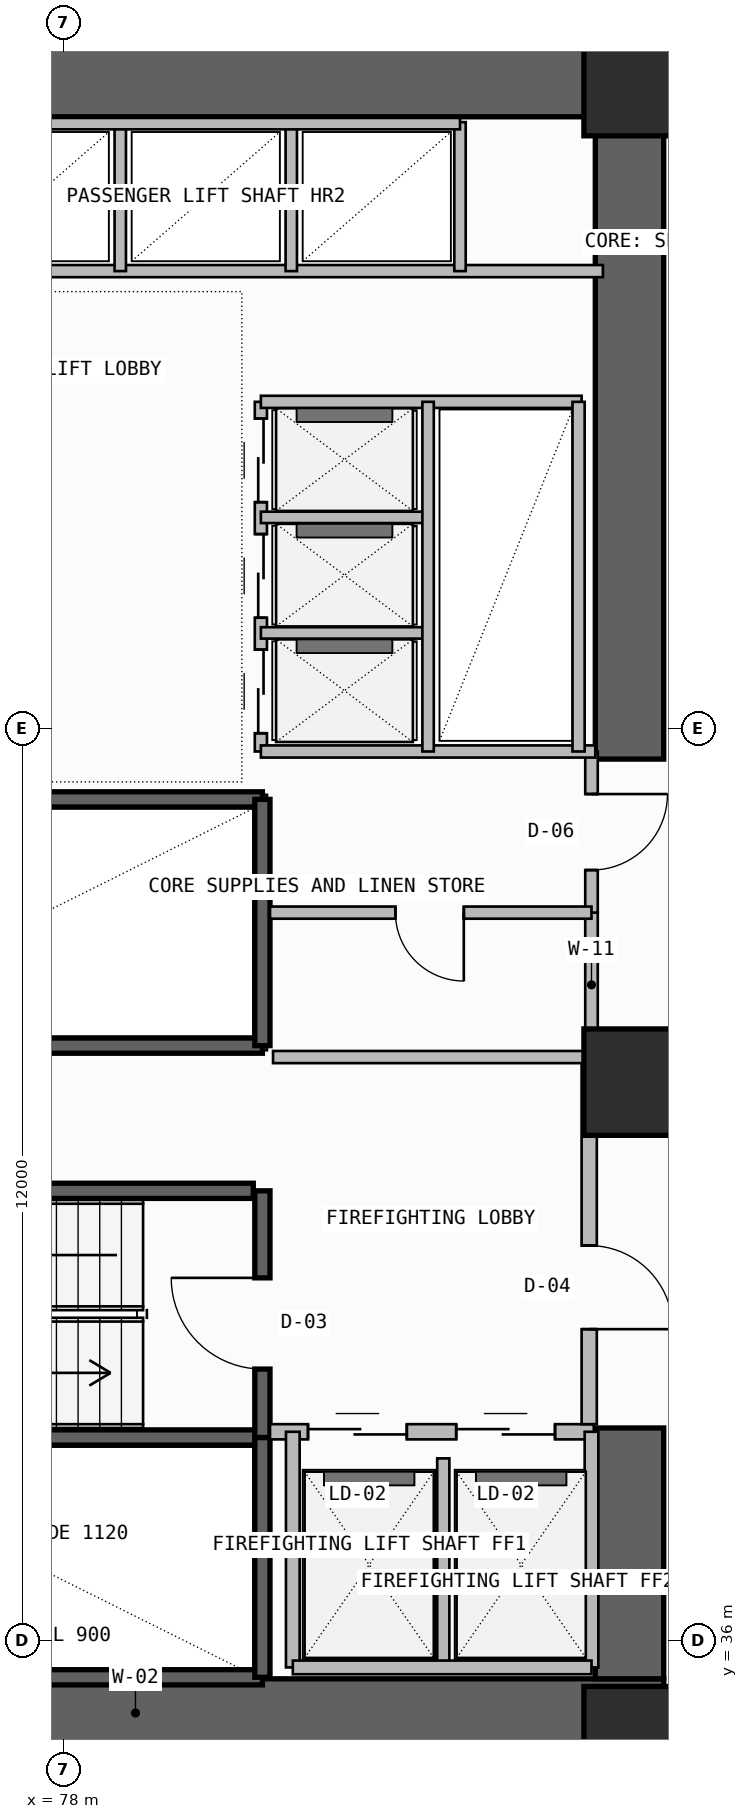
"""IFC4 building model, lengths in metres.
Left out: names, types, materials, properties, quantities, classifications, styles, units other than length and angle.
Written with IfcOpenShell. Run it as: python <this file> out.ifc"""

import sys

from ifc_helpers import new_model, si_unit, direction, frame, frame_2d, origin, origin_2d, place, context, subcontext, project, spatial, rectangle, extrude, element, fill, save


model = new_model("IFC4")
c1 = context("Model", 3, precision=1e-05, world=origin(), true_north=direction((0.0, 1.0)))
c2 = subcontext(c1, "Body", "Model", "MODEL_VIEW")
j1 = project(units=[si_unit("LENGTHUNIT", "METRE"), si_unit("PLANEANGLEUNIT", "RADIAN")], contexts=[c1])
p1 = place(None, origin())
s1 = spatial("IfcSite", under=j1, at=p1, CompositionType="ELEMENT")
p2 = place(p1, origin())
s2 = spatial("IfcBuilding", under=s1, at=p2, CompositionType="ELEMENT")
p3 = place(p2, frame((0.0, 0.0, 113.7)))
s3 = spatial("IfcBuildingStorey", under=s2, at=p3, CompositionType="ELEMENT", Elevation=113.7)
p4 = place(p3, frame((72.0, 35.05, -0.26), z_axis=(0.0, 0.0, 1.0), x_axis=(1.0, 0.0, 0.0)))
e1 = element("IfcWall", 1, at=p4, inside=s3, PredefinedType="SHEAR", context=c2, shape_type="SweptSolid", body=[
    extrude(rectangle(XDim=13.9, YDim=0.9, at=frame_2d((6.95, 0.0))), origin(), (0.0, 0.0, 1.0), 3.6),
])
p5 = place(p3, frame((85.45, 35.5, -0.26), z_axis=(0.0, 0.0, 1.0), x_axis=(0.0, 1.0, 0.0)))
e2 = element("IfcWall", 2, at=p5, inside=s3, PredefinedType="SHEAR", context=c2, shape_type="SweptSolid", body=[
    extrude(rectangle(XDim=3.3, YDim=0.9, at=frame_2d((1.65, 0.0))), origin(), (0.0, 0.0, 1.0), 3.6),
])
p6 = place(p3, frame((72.0, 56.5, -0.26), z_axis=(0.0, 0.0, 1.0), x_axis=(1.0, 0.0, 0.0)))
e3 = element("IfcWall", 3, at=p6, inside=s3, PredefinedType="SHEAR", context=c2, shape_type="SweptSolid", body=[
    extrude(rectangle(XDim=13.9, YDim=0.9, at=frame_2d((6.95, 0.0))), origin(), (0.0, 0.0, 1.0), 3.6),
])
p7 = place(p3, frame((85.45, 47.6, -0.26), z_axis=(0.0, 0.0, 1.0), x_axis=(0.0, 1.0, 0.0)))
e4 = element("IfcWall", 4, at=p7, inside=s3, PredefinedType="SHEAR", context=c2, shape_type="SweptSolid", body=[
    extrude(rectangle(XDim=8.45, YDim=0.9, at=frame_2d((4.225, 0.0))), origin(), (0.0, 0.0, 1.0), 3.6),
])
for number, where, z_axis, x_axis in (
    (5, (85.55, 34.7, 0.0), (0.0, 0.0, 1.0), (1.0, 0.0, 0.0)),
    (6, (85.55, 43.35, 0.0), (0.0, 0.0, 1.0), (1.0, 0.0, 0.0)),
    (7, (85.55, 56.5, 0.0), (0.0, 0.0, 1.0), (1.0, 0.0, 0.0)),
):
    element("IfcColumn", number, at=place(p3, frame(where, z_axis=z_axis, x_axis=x_axis)), inside=s3, PredefinedType="COLUMN", context=c2, shape_type="SweptSolid", body=[
        extrude(rectangle(XDim=1.4, YDim=1.4, at=origin_2d()), origin(), (0.0, 0.0, 1.0), 3.6),
    ])
for number, where, z_axis, x_axis in (
    (8, (72.92, 35.52, -0.26), (0.0, 0.0, 1.0), (1.0, 0.0, 0.0)),
    (9, (72.92, 38.675, -0.26), (0.0, 0.0, 1.0), (1.0, 0.0, 0.0)),
):
    element("IfcWall", number, at=place(p3, frame(where, z_axis=z_axis, x_axis=x_axis)), inside=s3, PredefinedType="SOLIDWALL", context=c2, shape_type="SweptSolid", body=[
        extrude(rectangle(XDim=7.7, YDim=0.2, at=frame_2d((3.85, 0.0))), origin(), (0.0, 0.0, 1.0), 3.6),
    ])
p8 = place(p3, frame((80.62, 35.52, -0.26), z_axis=(0.0, 0.0, 1.0), x_axis=(0.0, 1.0, 0.0)))
e10 = element("IfcWall", 10, at=p8, inside=s3, PredefinedType="SOLIDWALL", context=c2, shape_type="SweptSolid", body=[
    extrude(rectangle(XDim=3.155, YDim=0.2, at=frame_2d((1.578, 0.0))), origin(), (0.0, 0.0, 1.0), 3.6),
])
p9 = place(p3, frame((80.62, 38.675, -0.26), z_axis=(0.0, 0.0, 1.0), x_axis=(0.0, 1.0, 0.0)))
e11 = element("IfcWall", 11, at=p9, inside=s3, PredefinedType="SOLIDWALL", context=c2, shape_type="SweptSolid", body=[
    extrude(rectangle(XDim=3.245, YDim=0.2, at=frame_2d((1.623, 0.0))), origin(), (0.0, 0.0, 1.0), 3.6),
])
p10 = place(p9, frame((0.9, 0.0, 0.26)))
e12 = element("IfcOpeningElement", 12, at=p10, cuts=e11, PredefinedType="OPENING", context=c2, shape_type="SweptSolid", body=[
    extrude(rectangle(XDim=1.2, YDim=2.2, at=frame_2d((0.6, 1.1))), frame((0.0, 0.11, 0.0), z_axis=(0.0, -1.0, 0.0), x_axis=(1.0, 0.0, 0.0)), (0.0, 0.0, 1.0), 0.22),
])
p11 = place(p3, frame((80.72, 38.75, 0.0), z_axis=(0.0, 0.0, 1.0), x_axis=(1.0, 0.0, 0.0)))
e13 = element("IfcWall", 13, at=p11, inside=s3, PredefinedType="SOLIDWALL", context=c2, shape_type="SweptSolid", body=[
    extrude(rectangle(XDim=4.26, YDim=0.2, at=frame_2d((2.13, 0.0))), origin(), (0.0, 0.0, 1.0), 3.34),
])
p12 = place(p11, frame((0.5, 0.0, 0.0)))
e14 = element("IfcOpeningElement", 14, at=p12, cuts=e13, PredefinedType="OPENING", context=c2, shape_type="SweptSolid", body=[
    extrude(rectangle(XDim=1.3, YDim=2.3, at=frame_2d((0.65, 1.15))), frame((0.0, 0.11, 0.0), z_axis=(0.0, -1.0, 0.0), x_axis=(1.0, 0.0, 0.0)), (0.0, 0.0, 1.0), 0.22),
])
p13 = place(p11, frame((2.45, 0.0, 0.0)))
e15 = element("IfcOpeningElement", 15, at=p13, cuts=e13, PredefinedType="OPENING", context=c2, shape_type="SweptSolid", body=[
    extrude(rectangle(XDim=1.3, YDim=2.3, at=frame_2d((0.65, 1.15))), frame((0.0, 0.11, 0.0), z_axis=(0.0, -1.0, 0.0), x_axis=(1.0, 0.0, 0.0)), (0.0, 0.0, 1.0), 0.22),
])
p14 = place(p3, frame((83.0, 35.65, 0.0), z_axis=(0.0, 0.0, 1.0), x_axis=(0.0, 1.0, 0.0)))
e16 = element("IfcWall", 16, at=p14, inside=s3, PredefinedType="PLUMBINGWALL", context=c2, shape_type="SweptSolid", body=[
    extrude(rectangle(XDim=2.75, YDim=0.16, at=frame_2d((1.375, 0.0))), origin(), (0.0, 0.0, 1.0), 3.34),
])
for number, where, z_axis, x_axis in (
    (17, (84.95, 35.65, 0.0), (0.0, 0.0, 1.0), (0.0, 1.0, 0.0)),
    (18, (81.02, 35.65, 0.0), (0.0, 0.0, 1.0), (0.0, 1.0, 0.0)),
):
    element("IfcWall", number, at=place(p3, frame(where, z_axis=z_axis, x_axis=x_axis)), inside=s3, PredefinedType="SOLIDWALL", context=c2, shape_type="SweptSolid", body=[
        extrude(rectangle(XDim=3.1, YDim=0.18, at=frame_2d((1.55, 0.0))), origin(), (0.0, 0.0, 1.0), 3.34),
    ])
p15 = place(p3, frame((81.02, 35.65, 0.0), z_axis=(0.0, 0.0, 1.0), x_axis=(1.0, 0.0, 0.0)))
e19 = element("IfcWall", 19, at=p15, inside=s3, PredefinedType="SOLIDWALL", context=c2, shape_type="SweptSolid", body=[
    extrude(rectangle(XDim=3.93, YDim=0.18, at=frame_2d((1.965, 0.0))), origin(), (0.0, 0.0, 1.0), 3.34),
])
p16 = place(p3, frame((84.92, 38.85, 0.0), z_axis=(0.0, 0.0, 1.0), x_axis=(0.0, 1.0, 0.0)))
e20 = element("IfcWall", 20, at=p16, inside=s3, PredefinedType="SOLIDWALL", context=c2, shape_type="SweptSolid", body=[
    extrude(rectangle(XDim=4.83, YDim=0.2, at=frame_2d((2.415, 0.0))), origin(), (0.0, 0.0, 1.0), 3.34),
])
p17 = place(p16, frame((1.25, 0.0, 0.0)))
e21 = element("IfcOpeningElement", 21, at=p17, cuts=e20, PredefinedType="OPENING", context=c2, shape_type="SweptSolid", body=[
    extrude(rectangle(XDim=1.1, YDim=2.2, at=frame_2d((0.55, 1.1))), frame((0.0, 0.11, 0.0), z_axis=(0.0, -1.0, 0.0), x_axis=(1.0, 0.0, 0.0)), (0.0, 0.0, 1.0), 0.22),
])
p18 = place(p3, frame((72.92, 41.92, -0.26), z_axis=(0.0, 0.0, 1.0), x_axis=(1.0, 0.0, 0.0)))
e22 = element("IfcWall", 22, at=p18, inside=s3, PredefinedType="SOLIDWALL", context=c2, shape_type="SweptSolid", body=[
    extrude(rectangle(XDim=7.58, YDim=0.2, at=frame_2d((3.79, 0.0))), origin(), (0.0, 0.0, 1.0), 3.6),
])
for number, where, z_axis, x_axis in (
    (23, (72.92, 43.83, -0.26), (0.0, 0.0, 1.0), (1.0, 0.0, 0.0)),
    (24, (72.92, 47.07, -0.26), (0.0, 0.0, 1.0), (1.0, 0.0, 0.0)),
):
    element("IfcWall", number, at=place(p3, frame(where, z_axis=z_axis, x_axis=x_axis)), inside=s3, PredefinedType="SOLIDWALL", context=c2, shape_type="SweptSolid", body=[
        extrude(rectangle(XDim=7.7, YDim=0.2, at=frame_2d((3.85, 0.0))), origin(), (0.0, 0.0, 1.0), 3.6),
    ])
p19 = place(p3, frame((80.62, 43.83, -0.26), z_axis=(0.0, 0.0, 1.0), x_axis=(0.0, 1.0, 0.0)))
e25 = element("IfcWall", 25, at=p19, inside=s3, PredefinedType="SOLIDWALL", context=c2, shape_type="SweptSolid", body=[
    extrude(rectangle(XDim=3.24, YDim=0.2, at=frame_2d((1.62, 0.0))), origin(), (0.0, 0.0, 1.0), 3.6),
])
p20 = place(p3, frame((84.95, 43.68, 0.0), z_axis=(0.0, 0.0, 1.0), x_axis=(0.0, 1.0, 0.0)))
e26 = element("IfcWall", 26, at=p20, inside=s3, PredefinedType="PLUMBINGWALL", context=c2, shape_type="SweptSolid", body=[
    extrude(rectangle(XDim=1.9, YDim=0.165, at=frame_2d((0.95, 0.0))), origin(), (0.0, 0.0, 1.0), 3.34),
])
p21 = place(p3, frame((84.95, 45.58, 0.0), z_axis=(0.0, 0.0, 1.0), x_axis=(0.0, 1.0, 0.0)))
e27 = element("IfcWall", 27, at=p21, inside=s3, PredefinedType="PARTITIONING", context=c2, shape_type="SweptSolid", body=[
    extrude(rectangle(XDim=2.12, YDim=0.165, at=frame_2d((1.06, 0.0))), origin(), (0.0, 0.0, 1.0), 3.34),
])
p22 = place(p21, frame((0.56, 0.0, 0.0)))
e28 = element("IfcOpeningElement", 28, at=p22, cuts=e27, PredefinedType="OPENING", context=c2, shape_type="SweptSolid", body=[
    extrude(rectangle(XDim=1.0, YDim=2.2, at=frame_2d((0.5, 1.1))), frame((0.0, 0.093, 0.0), z_axis=(0.0, -1.0, 0.0), x_axis=(1.0, 0.0, 0.0)), (0.0, 0.0, 1.0), 0.185),
])
p23 = place(p3, frame((80.72, 45.58, 0.0), z_axis=(0.0, 0.0, 1.0), x_axis=(1.0, 0.0, 0.0)))
e29 = element("IfcWall", 29, at=p23, inside=s3, PredefinedType="PLUMBINGWALL", context=c2, shape_type="SweptSolid", body=[
    extrude(rectangle(XDim=4.23, YDim=0.16, at=frame_2d((2.115, 0.0))), origin(), (0.0, 0.0, 1.0), 3.34),
])
p24 = place(p23, frame((1.65, 0.0, 0.0)))
e30 = element("IfcOpeningElement", 30, at=p24, cuts=e29, PredefinedType="OPENING", context=c2, shape_type="SweptSolid", body=[
    extrude(rectangle(XDim=0.9, YDim=2.1, at=frame_2d((0.45, 1.05))), frame((0.0, 0.09, 0.0), z_axis=(0.0, -1.0, 0.0), x_axis=(1.0, 0.0, 0.0)), (0.0, 0.0, 1.0), 0.18),
])
p25 = place(p3, frame((80.76, 43.68, 0.0), z_axis=(0.0, 0.0, 1.0), x_axis=(1.0, 0.0, 0.0)))
e31 = element("IfcWall", 31, at=p25, inside=s3, PredefinedType="PLUMBINGWALL", context=c2, shape_type="SweptSolid", body=[
    extrude(rectangle(XDim=4.19, YDim=0.16, at=frame_2d((2.095, 0.0))), origin(), (0.0, 0.0, 1.0), 3.34),
])
p26 = place(p3, frame((80.6, 47.7, 0.0), z_axis=(0.0, 0.0, 1.0), x_axis=(0.0, 1.0, 0.0)))
e32 = element("IfcWall", 32, at=p26, inside=s3, PredefinedType="SOLIDWALL", context=c2, shape_type="SweptSolid", body=[
    extrude(rectangle(XDim=4.6, YDim=0.16, at=frame_2d((2.3, 0.0))), origin(), (0.0, 0.0, 1.0), 3.34),
])
p27 = place(p26, frame((0.24, 0.0, 0.0)))
e33 = element("IfcOpeningElement", 33, at=p27, cuts=e32, PredefinedType="OPENING", context=c2, shape_type="SweptSolid", body=[
    extrude(rectangle(XDim=1.1, YDim=2.25, at=frame_2d((0.55, 1.125))), frame((0.0, 0.09, 0.0), z_axis=(0.0, -1.0, 0.0), x_axis=(1.0, 0.0, 0.0)), (0.0, 0.0, 1.0), 0.18),
])
p28 = place(p26, frame((1.76, 0.0, 0.0)))
e34 = element("IfcOpeningElement", 34, at=p28, cuts=e32, PredefinedType="OPENING", context=c2, shape_type="SweptSolid", body=[
    extrude(rectangle(XDim=1.1, YDim=2.25, at=frame_2d((0.55, 1.125))), frame((0.0, 0.09, 0.0), z_axis=(0.0, -1.0, 0.0), x_axis=(1.0, 0.0, 0.0)), (0.0, 0.0, 1.0), 0.18),
])
p29 = place(p26, frame((3.28, 0.0, 0.0)))
e35 = element("IfcOpeningElement", 35, at=p29, cuts=e32, PredefinedType="OPENING", context=c2, shape_type="SweptSolid", body=[
    extrude(rectangle(XDim=1.1, YDim=2.25, at=frame_2d((0.55, 1.125))), frame((0.0, 0.09, 0.0), z_axis=(0.0, -1.0, 0.0), x_axis=(1.0, 0.0, 0.0)), (0.0, 0.0, 1.0), 0.18),
])
p30 = place(p3, frame((80.6, 47.7, 0.0), z_axis=(0.0, 0.0, 1.0), x_axis=(1.0, 0.0, 0.0)))
e36 = element("IfcWall", 36, at=p30, inside=s3, PredefinedType="SOLIDWALL", context=c2, shape_type="SweptSolid", body=[
    extrude(rectangle(XDim=4.4, YDim=0.16, at=frame_2d((2.2, 0.0))), origin(), (0.0, 0.0, 1.0), 3.34),
])
p31 = place(p3, frame((80.6, 52.3, 0.0), z_axis=(0.0, 0.0, 1.0), x_axis=(1.0, 0.0, 0.0)))
e37 = element("IfcWall", 37, at=p31, inside=s3, PredefinedType="SOLIDWALL", context=c2, shape_type="SweptSolid", body=[
    extrude(rectangle(XDim=4.22, YDim=0.16, at=frame_2d((2.11, 0.0))), origin(), (0.0, 0.0, 1.0), 3.34),
])
for number, where, z_axis, x_axis in (
    (38, (80.6, 49.26, 0.0), (0.0, 0.0, 1.0), (1.0, 0.0, 0.0)),
    (39, (80.6, 50.78, 0.0), (0.0, 0.0, 1.0), (1.0, 0.0, 0.0)),
):
    element("IfcWall", number, at=place(p3, frame(where, z_axis=z_axis, x_axis=x_axis)), inside=s3, PredefinedType="PLUMBINGWALL", context=c2, shape_type="SweptSolid", body=[
        extrude(rectangle(XDim=2.2, YDim=0.15, at=frame_2d((1.1, 0.0))), origin(), (0.0, 0.0, 1.0), 3.34),
    ])
p32 = place(p3, frame((82.8, 47.7, 0.0), z_axis=(0.0, 0.0, 1.0), x_axis=(0.0, 1.0, 0.0)))
e40 = element("IfcWall", 40, at=p32, inside=s3, PredefinedType="PLUMBINGWALL", context=c2, shape_type="SweptSolid", body=[
    extrude(rectangle(XDim=4.6, YDim=0.15, at=frame_2d((2.3, 0.0))), origin(), (0.0, 0.0, 1.0), 3.34),
])
p33 = place(p3, frame((84.78, 47.7, 0.0), z_axis=(0.0, 0.0, 1.0), x_axis=(0.0, 1.0, 0.0)))
e41 = element("IfcWall", 41, at=p33, inside=s3, PredefinedType="SOLIDWALL", context=c2, shape_type="SweptSolid", body=[
    extrude(rectangle(XDim=4.6, YDim=0.16, at=frame_2d((2.3, 0.0))), origin(), (0.0, 0.0, 1.0), 3.34),
])
p34 = place(p3, frame((73.02, 54.02, 0.0), z_axis=(0.0, 0.0, 1.0), x_axis=(1.0, 0.0, 0.0)))
e42 = element("IfcWall", 42, at=p34, inside=s3, PredefinedType="SOLIDWALL", context=c2, shape_type="SweptSolid", body=[
    extrude(rectangle(XDim=12.08, YDim=0.16, at=frame_2d((6.04, 0.0))), origin(), (0.0, 0.0, 1.0), 3.34),
])
for number, where, z_axis, x_axis in (
    (43, (78.75, 54.02, 0.0), (0.0, 0.0, 1.0), (0.0, 1.0, 0.0)),
    (44, (81.0, 54.02, 0.0), (0.0, 0.0, 1.0), (0.0, 1.0, 0.0)),
):
    element("IfcWall", number, at=place(p3, frame(where, z_axis=z_axis, x_axis=x_axis)), inside=s3, PredefinedType="PLUMBINGWALL", context=c2, shape_type="SweptSolid", body=[
        extrude(rectangle(XDim=1.96, YDim=0.15, at=frame_2d((0.98, 0.0))), origin(), (0.0, 0.0, 1.0), 3.34),
    ])
p35 = place(p3, frame((83.22, 54.02, 0.0), z_axis=(0.0, 0.0, 1.0), x_axis=(0.0, 1.0, 0.0)))
e45 = element("IfcWall", 45, at=p35, inside=s3, PredefinedType="SOLIDWALL", context=c2, shape_type="SweptSolid", body=[
    extrude(rectangle(XDim=1.96, YDim=0.15, at=frame_2d((0.98, 0.0))), origin(), (0.0, 0.0, 1.0), 3.34),
])
p36 = place(p3, frame((76.52, 55.96, 0.0), z_axis=(0.0, 0.0, 1.0), x_axis=(1.0, 0.0, 0.0)))
e46 = element("IfcWall", 46, at=p36, inside=s3, PredefinedType="SOLIDWALL", context=c2, shape_type="SweptSolid", body=[
    extrude(rectangle(XDim=6.7, YDim=0.15, at=frame_2d((3.35, 0.0))), origin(), (0.0, 0.0, 1.0), 3.34),
])
p37 = place(p10, origin())
e47 = element("IfcDoor", 47, at=p37, inside=s3, OperationType="SINGLE_SWING_RIGHT", PredefinedType="USERDEFINED", context=c2, shape_type="SweptSolid", body=[
    extrude(rectangle(XDim=1.2, YDim=2.2, at=frame_2d((0.6, 1.1))), frame((0.0, 0.025, 0.0), z_axis=(0.0, -1.0, 0.0), x_axis=(1.0, 0.0, 0.0)), (0.0, 0.0, 1.0), 0.05),
])
fill(e12, e47)
p38 = place(p12, origin())
e48 = element("IfcDoor", 48, at=p38, inside=s3, OperationType="DOUBLE_DOOR_SLIDING", PredefinedType="DOOR", context=c2, shape_type="SweptSolid", body=[
    extrude(rectangle(XDim=1.3, YDim=2.3, at=frame_2d((0.65, 1.15))), frame((0.0, 0.025, 0.0), z_axis=(0.0, -1.0, 0.0), x_axis=(1.0, 0.0, 0.0)), (0.0, 0.0, 1.0), 0.05),
])
fill(e14, e48)
p39 = place(p13, origin())
e49 = element("IfcDoor", 49, at=p39, inside=s3, OperationType="DOUBLE_DOOR_SLIDING", PredefinedType="DOOR", context=c2, shape_type="SweptSolid", body=[
    extrude(rectangle(XDim=1.3, YDim=2.3, at=frame_2d((0.65, 1.15))), frame((0.0, 0.025, 0.0), z_axis=(0.0, -1.0, 0.0), x_axis=(1.0, 0.0, 0.0)), (0.0, 0.0, 1.0), 0.05),
])
fill(e15, e49)
p40 = place(p17, frame((1.1, 0.0, 0.0), z_axis=(0.0, 0.0, 1.0), x_axis=(-1.0, 0.0, 0.0)))
e50 = element("IfcDoor", 50, at=p40, inside=s3, OperationType="SINGLE_SWING_RIGHT", PredefinedType="DOOR", context=c2, shape_type="SweptSolid", body=[
    extrude(rectangle(XDim=1.1, YDim=2.2, at=frame_2d((0.55, 1.1))), frame((0.0, 0.025, 0.0), z_axis=(0.0, -1.0, 0.0), x_axis=(1.0, 0.0, 0.0)), (0.0, 0.0, 1.0), 0.05),
])
fill(e21, e50)
p41 = place(p22, frame((1.0, 0.0, 0.0), z_axis=(0.0, 0.0, 1.0), x_axis=(-1.0, 0.0, 0.0)))
e51 = element("IfcDoor", 51, at=p41, inside=s3, OperationType="SINGLE_SWING_LEFT", PredefinedType="DOOR", context=c2, shape_type="SweptSolid", body=[
    extrude(rectangle(XDim=1.0, YDim=2.2, at=frame_2d((0.5, 1.1))), frame((0.0, 0.025, 0.0), z_axis=(0.0, -1.0, 0.0), x_axis=(1.0, 0.0, 0.0)), (0.0, 0.0, 1.0), 0.05),
])
fill(e28, e51)
p42 = place(p24, frame((0.9, 0.0, 0.0), z_axis=(0.0, 0.0, 1.0), x_axis=(-1.0, 0.0, 0.0)))
e52 = element("IfcDoor", 52, at=p42, inside=s3, OperationType="SINGLE_SWING_LEFT", PredefinedType="DOOR", context=c2, shape_type="SweptSolid", body=[
    extrude(rectangle(XDim=0.9, YDim=2.1, at=frame_2d((0.45, 1.05))), frame((0.0, 0.025, 0.0), z_axis=(0.0, -1.0, 0.0), x_axis=(1.0, 0.0, 0.0)), (0.0, 0.0, 1.0), 0.05),
])
fill(e30, e52)
p43 = place(p27, frame((1.1, 0.0, 0.0), z_axis=(0.0, 0.0, 1.0), x_axis=(-1.0, 0.0, 0.0)))
e53 = element("IfcDoor", 53, at=p43, inside=s3, OperationType="DOUBLE_DOOR_SLIDING", PredefinedType="DOOR", context=c2, shape_type="SweptSolid", body=[
    extrude(rectangle(XDim=1.1, YDim=2.25, at=frame_2d((0.55, 1.125))), frame((0.0, 0.025, 0.0), z_axis=(0.0, -1.0, 0.0), x_axis=(1.0, 0.0, 0.0)), (0.0, 0.0, 1.0), 0.05),
])
fill(e33, e53)
p44 = place(p28, frame((1.1, 0.0, 0.0), z_axis=(0.0, 0.0, 1.0), x_axis=(-1.0, 0.0, 0.0)))
e54 = element("IfcDoor", 54, at=p44, inside=s3, OperationType="DOUBLE_DOOR_SLIDING", PredefinedType="DOOR", context=c2, shape_type="SweptSolid", body=[
    extrude(rectangle(XDim=1.1, YDim=2.25, at=frame_2d((0.55, 1.125))), frame((0.0, 0.025, 0.0), z_axis=(0.0, -1.0, 0.0), x_axis=(1.0, 0.0, 0.0)), (0.0, 0.0, 1.0), 0.05),
])
fill(e34, e54)
p45 = place(p29, frame((1.1, 0.0, 0.0), z_axis=(0.0, 0.0, 1.0), x_axis=(-1.0, 0.0, 0.0)))
e55 = element("IfcDoor", 55, at=p45, inside=s3, OperationType="DOUBLE_DOOR_SLIDING", PredefinedType="DOOR", context=c2, shape_type="SweptSolid", body=[
    extrude(rectangle(XDim=1.1, YDim=2.25, at=frame_2d((0.55, 1.125))), frame((0.0, 0.025, 0.0), z_axis=(0.0, -1.0, 0.0), x_axis=(1.0, 0.0, 0.0)), (0.0, 0.0, 1.0), 0.05),
])
fill(e35, e55)
save(model, sys.argv[1])
